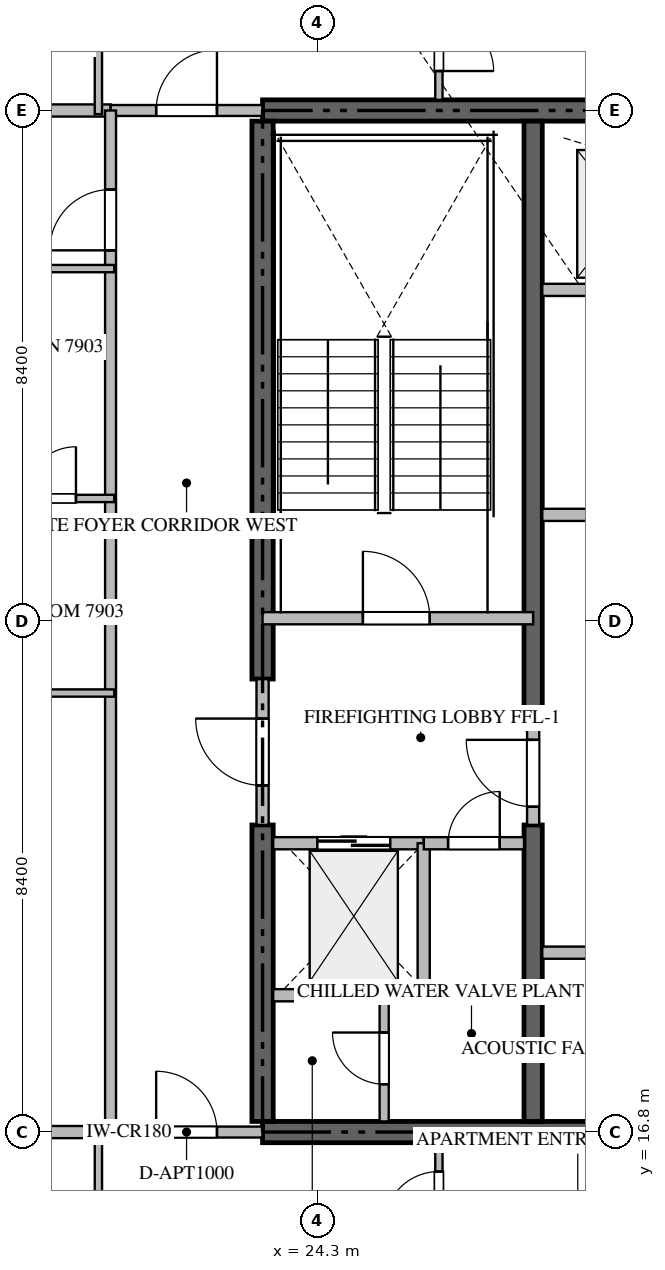
"""IFC4 building model, lengths in metres.
Left out: names, types, materials, properties, quantities, classifications, styles, units other than length and angle.
Written with IfcOpenShell. Run it as: python <this file> out.ifc"""

import sys

from ifc_helpers import new_model, si_unit, direction, frame, frame_2d, origin, place, context, subcontext, project, spatial, rectangle, extrude, source, transform, mapped, element, fill, save


model = new_model("IFC4")
c1 = context("Model", 3, precision=1e-05, world=origin(), true_north=direction((0.0, 1.0)))
c2 = subcontext(c1, "Body", "Model", "MODEL_VIEW")
j1 = project(units=[si_unit("LENGTHUNIT", "METRE"), si_unit("PLANEANGLEUNIT", "RADIAN")], contexts=[c1])
p1 = place(None, origin())
s1 = spatial("IfcSite", under=j1, at=p1, CompositionType="ELEMENT")
p2 = place(p1, origin())
s2 = spatial("IfcBuilding", under=s1, at=p2, CompositionType="ELEMENT")
p3 = place(p2, frame((0.0, 0.0, 317.75)))
s3 = spatial("IfcBuildingStorey", under=s2, at=p3, CompositionType="ELEMENT", Elevation=317.75)
for number, where, z_axis, x_axis in (
    (1, (23.4, 16.8, -0.26), (0.0, 0.0, 1.0), (1.0, 0.0, 0.0)),
    (2, (41.4, 33.6, -0.26), (0.0, 0.0, 1.0), (-1.0, 0.0, 0.0)),
):
    element("IfcWall", number, at=place(p3, frame(where, z_axis=z_axis, x_axis=x_axis)), inside=s3, PredefinedType="SHEAR", context=c2, shape_type="SweptSolid", body=[
        extrude(rectangle(XDim=18.0, YDim=0.35, at=frame_2d((9.0, 0.0))), origin(), (0.0, 0.0, 1.0), 4.048),
    ])
p4 = place(p3, frame((23.4, 16.975, -0.26), z_axis=(0.0, 0.0, 1.0), x_axis=(0.0, 1.0, 0.0)))
e3 = element("IfcWall", 3, at=p4, inside=s3, PredefinedType="SHEAR", context=c2, shape_type="SweptSolid", body=[
    extrude(rectangle(XDim=4.875, YDim=0.35, at=frame_2d((2.438, 0.0))), origin(), (0.0, 0.0, 1.0), 4.048),
])
p5 = place(p3, frame((23.4, 24.25, -0.26), z_axis=(0.0, 0.0, 1.0), x_axis=(0.0, 1.0, 0.0)))
e4 = element("IfcWall", 4, at=p5, inside=s3, PredefinedType="SHEAR", context=c2, shape_type="SweptSolid", body=[
    extrude(rectangle(XDim=9.175, YDim=0.35, at=frame_2d((4.587, 0.0))), origin(), (0.0, 0.0, 1.0), 4.048),
])
p6 = place(p3, frame((27.85, 16.975, -0.26), z_axis=(0.0, 0.0, 1.0), x_axis=(0.0, 1.0, 0.0)))
e5 = element("IfcWall", 5, at=p6, inside=s3, PredefinedType="SHEAR", context=c2, shape_type="SweptSolid", body=[
    extrude(rectangle(XDim=4.875, YDim=0.3, at=frame_2d((2.438, 0.0))), origin(), (0.0, 0.0, 1.0), 4.048),
])
p7 = place(p3, frame((27.85, 23.55, -0.26), z_axis=(0.0, 0.0, 1.0), x_axis=(0.0, 1.0, 0.0)))
e6 = element("IfcWall", 6, at=p7, inside=s3, PredefinedType="SHEAR", context=c2, shape_type="SweptSolid", body=[
    extrude(rectangle(XDim=9.875, YDim=0.3, at=frame_2d((4.938, 0.0))), origin(), (0.0, 0.0, 1.0), 4.048),
])
p8 = place(p3, frame((23.4, 25.25, 0.0), z_axis=(0.0, 0.0, 1.0), x_axis=(1.0, 0.0, 0.0)))
e7 = element("IfcWall", 7, at=p8, inside=s3, PredefinedType="STANDARD", context=c2, shape_type="SweptSolid", body=[
    extrude(rectangle(XDim=4.45, YDim=0.2, at=frame_2d((2.225, 0.0))), origin(), (0.0, 0.0, 1.0), 3.79),
])
p9 = place(p8, frame((1.65, 0.0, 0.0)))
e8 = element("IfcOpeningElement", 8, at=p9, cuts=e7, PredefinedType="OPENING", context=c2, shape_type="SweptSolid", body=[
    extrude(rectangle(XDim=1.1, YDim=2.15, at=frame_2d((0.55, 1.075))), frame((0.0, 0.11, 0.0), z_axis=(0.0, -1.0, 0.0), x_axis=(1.0, 0.0, 0.0)), (0.0, 0.0, 1.0), 0.22),
])
p10 = place(p3, frame((23.575, 21.55, 0.0), z_axis=(0.0, 0.0, 1.0), x_axis=(1.0, 0.0, 0.0)))
e9 = element("IfcWall", 9, at=p10, inside=s3, PredefinedType="STANDARD", context=c2, shape_type="SweptSolid", body=[
    extrude(rectangle(XDim=2.475, YDim=0.2, at=frame_2d((1.238, 0.0))), origin(), (0.0, 0.0, 1.0), 3.79),
])
p11 = place(p10, frame((0.725, 0.0, 0.0)))
e10 = element("IfcOpeningElement", 10, at=p11, cuts=e9, PredefinedType="OPENING", context=c2, shape_type="SweptSolid", body=[
    extrude(rectangle(XDim=1.2, YDim=2.2, at=frame_2d((0.6, 1.1))), frame((0.0, 0.11, 0.0), z_axis=(0.0, -1.0, 0.0), x_axis=(1.0, 0.0, 0.0)), (0.0, 0.0, 1.0), 0.22),
])
p12 = place(p3, frame((28.0, 30.65, 0.0), z_axis=(0.0, 0.0, 1.0), x_axis=(1.0, 0.0, 0.0)))
e11 = element("IfcWall", 11, at=p12, inside=s3, PredefinedType="STANDARD", context=c2, shape_type="SweptSolid", body=[
    extrude(rectangle(XDim=2.55, YDim=0.2, at=frame_2d((1.275, 0.0))), origin(), (0.0, 0.0, 1.0), 3.79),
])
p13 = place(p12, frame((0.85, 0.0, 0.0)))
e12 = element("IfcOpeningElement", 12, at=p13, cuts=e11, PredefinedType="OPENING", context=c2, shape_type="SweptSolid", body=[
    extrude(rectangle(XDim=1.1, YDim=2.2, at=frame_2d((0.55, 1.1))), frame((0.0, 0.11, 0.0), z_axis=(0.0, -1.0, 0.0), x_axis=(1.0, 0.0, 0.0)), (0.0, 0.0, 1.0), 0.22),
])
p14 = place(p3, frame((26.05, 19.05, 0.0), z_axis=(0.0, 0.0, 1.0), x_axis=(0.0, 1.0, 0.0)))
e13 = element("IfcWall", 13, at=p14, inside=s3, PredefinedType="STANDARD", context=c2, shape_type="SweptSolid", body=[
    extrude(rectangle(XDim=2.5, YDim=0.2, at=frame_2d((1.25, 0.0))), origin(), (0.0, 0.0, 1.0), 3.79),
])
p15 = place(p3, frame((23.575, 19.05, 0.0), z_axis=(0.0, 0.0, 1.0), x_axis=(1.0, 0.0, 0.0)))
e14 = element("IfcWall", 14, at=p15, inside=s3, PredefinedType="STANDARD", context=c2, shape_type="SweptSolid", body=[
    extrude(rectangle(XDim=2.475, YDim=0.2, at=frame_2d((1.238, 0.0))), origin(), (0.0, 0.0, 1.0), 3.79),
])
p16 = place(p3, frame((26.052, 21.55, 0.0), z_axis=(0.0, 0.0, 1.0), x_axis=(1.0, 0.0, 0.0)))
e15 = element("IfcWall", 15, at=p16, inside=s3, PredefinedType="STANDARD", context=c2, shape_type="SweptSolid", body=[
    extrude(rectangle(XDim=1.648, YDim=0.2, at=frame_2d((0.824, 0.0))), origin(), (0.0, 0.0, 1.0), 3.79),
])
p17 = place(p16, frame((0.399, 0.0, 0.0)))
e16 = element("IfcOpeningElement", 16, at=p17, cuts=e15, PredefinedType="OPENING", context=c2, shape_type="SweptSolid", body=[
    extrude(rectangle(XDim=0.85, YDim=2.1, at=frame_2d((0.425, 1.05))), frame((0.0, 0.11, 0.0), z_axis=(0.0, -1.0, 0.0), x_axis=(1.0, 0.0, 0.0)), (0.0, 0.0, 1.0), 0.22),
])
p18 = place(p3, frame((23.4, 21.852, 0.0), z_axis=(0.0, 0.0, 1.0), x_axis=(0.0, 1.0, 0.0)))
e17 = element("IfcWall", 17, at=p18, inside=s3, PredefinedType="STANDARD", context=c2, shape_type="SweptSolid", body=[
    extrude(rectangle(XDim=2.396, YDim=0.2, at=frame_2d((1.198, 0.0))), origin(), (0.0, 0.0, 1.0), 3.79),
])
p19 = place(p18, frame((0.648, 0.0, 0.0)))
e18 = element("IfcOpeningElement", 18, at=p19, cuts=e17, PredefinedType="OPENING", context=c2, shape_type="SweptSolid", body=[
    extrude(rectangle(XDim=1.1, YDim=2.15, at=frame_2d((0.55, 1.075))), frame((0.0, 0.11, 0.0), z_axis=(0.0, -1.0, 0.0), x_axis=(1.0, 0.0, 0.0)), (0.0, 0.0, 1.0), 0.22),
])
p20 = place(p3, frame((27.85, 21.852, 0.0), z_axis=(0.0, 0.0, 1.0), x_axis=(0.0, 1.0, 0.0)))
e19 = element("IfcWall", 19, at=p20, inside=s3, PredefinedType="STANDARD", context=c2, shape_type="SweptSolid", body=[
    extrude(rectangle(XDim=1.696, YDim=0.2, at=frame_2d((0.848, 0.0))), origin(), (0.0, 0.0, 1.0), 3.79),
])
p21 = place(p20, frame((0.298, 0.0, 0.0)))
e20 = element("IfcOpeningElement", 20, at=p21, cuts=e19, PredefinedType="OPENING", context=c2, shape_type="SweptSolid", body=[
    extrude(rectangle(XDim=1.1, YDim=2.15, at=frame_2d((0.55, 1.075))), frame((0.0, 0.11, 0.0), z_axis=(0.0, -1.0, 0.0), x_axis=(1.0, 0.0, 0.0)), (0.0, 0.0, 1.0), 0.22),
])
p22 = place(p3, frame((25.4, 16.975, 0.0), z_axis=(0.0, 0.0, 1.0), x_axis=(0.0, 1.0, 0.0)))
e21 = element("IfcWall", 21, at=p22, inside=s3, PredefinedType="PARTITIONING", context=c2, shape_type="SweptSolid", body=[
    extrude(rectangle(XDim=2.075, YDim=0.15, at=frame_2d((1.038, 0.0))), origin(), (0.0, 0.0, 1.0), 3.79),
])
p23 = place(p22, frame((0.612, 0.0, 0.0)))
e22 = element("IfcOpeningElement", 22, at=p23, cuts=e21, PredefinedType="OPENING", context=c2, shape_type="SweptSolid", body=[
    extrude(rectangle(XDim=0.85, YDim=2.1, at=frame_2d((0.425, 1.05))), frame((0.0, 0.085, 0.0), z_axis=(0.0, -1.0, 0.0), x_axis=(1.0, 0.0, 0.0)), (0.0, 0.0, 1.0), 0.17),
])
p24 = place(p3, frame((28.0, 19.75, 0.0), z_axis=(0.0, 0.0, 1.0), x_axis=(1.0, 0.0, 0.0)))
e23 = element("IfcWall", 23, at=p24, inside=s3, PredefinedType="STANDARD", context=c2, shape_type="SweptSolid", body=[
    extrude(rectangle(XDim=4.4, YDim=0.2, at=frame_2d((2.2, 0.0))), origin(), (0.0, 0.0, 1.0), 3.79),
])
p25 = place(p24, frame((1.75, 0.0, 0.0)))
e24 = element("IfcOpeningElement", 24, at=p25, cuts=e23, PredefinedType="OPENING", context=c2, shape_type="SweptSolid", body=[
    extrude(rectangle(XDim=0.9, YDim=2.1, at=frame_2d((0.45, 1.05))), frame((0.0, 0.11, 0.0), z_axis=(0.0, -1.0, 0.0), x_axis=(1.0, 0.0, 0.0)), (0.0, 0.0, 1.0), 0.22),
])
p26 = place(p3, frame((28.0, 26.95, 0.0), z_axis=(0.0, 0.0, 1.0), x_axis=(1.0, 0.0, 0.0)))
e25 = element("IfcWall", 25, at=p26, inside=s3, PredefinedType="STANDARD", context=c2, shape_type="SweptSolid", body=[
    extrude(rectangle(XDim=6.95, YDim=0.2, at=frame_2d((3.475, 0.0))), origin(), (0.0, 0.0, 1.0), 3.79),
])
for number, where, z_axis, x_axis in (
    (26, (9.282, 16.8, 0.0), (0.0, 0.0, 1.0), (1.0, 0.0, 0.0)),
    (27, (9.282, 33.6, 0.0), (0.0, 0.0, 1.0), (1.0, 0.0, 0.0)),
):
    element("IfcWall", number, at=place(p3, frame(where, z_axis=z_axis, x_axis=x_axis)), inside=s3, PredefinedType="PARTITIONING", context=c2, shape_type="SweptSolid", body=[
        extrude(rectangle(XDim=11.618, YDim=0.2, at=frame_2d((5.809, 0.0))), origin(), (0.0, 0.0, 1.0), 3.79),
    ])
p27 = place(p3, frame((20.902, 16.8, 0.0), z_axis=(0.0, 0.0, 1.0), x_axis=(1.0, 0.0, 0.0)))
e28 = element("IfcWall", 28, at=p27, inside=s3, PredefinedType="PARTITIONING", context=c2, shape_type="SweptSolid", body=[
    extrude(rectangle(XDim=2.496, YDim=0.18, at=frame_2d((1.248, 0.0))), origin(), (0.0, 0.0, 1.0), 3.79),
])
p28 = place(p27, frame((0.748, 0.0, 0.0)))
e29 = element("IfcOpeningElement", 29, at=p28, cuts=e28, PredefinedType="OPENING", context=c2, shape_type="SweptSolid", body=[
    extrude(rectangle(XDim=1.0, YDim=2.15, at=frame_2d((0.5, 1.075))), frame((0.0, 0.1, 0.0), z_axis=(0.0, -1.0, 0.0), x_axis=(1.0, 0.0, 0.0)), (0.0, 0.0, 1.0), 0.2),
])
p29 = place(p3, frame((20.902, 33.6, 0.0), z_axis=(0.0, 0.0, 1.0), x_axis=(1.0, 0.0, 0.0)))
e30 = element("IfcWall", 30, at=p29, inside=s3, PredefinedType="PARTITIONING", context=c2, shape_type="SweptSolid", body=[
    extrude(rectangle(XDim=2.496, YDim=0.18, at=frame_2d((1.248, 0.0))), origin(), (0.0, 0.0, 1.0), 3.79),
])
p30 = place(p29, frame((0.748, 0.0, 0.0)))
e31 = element("IfcOpeningElement", 31, at=p30, cuts=e30, PredefinedType="OPENING", context=c2, shape_type="SweptSolid", body=[
    extrude(rectangle(XDim=1.0, YDim=2.15, at=frame_2d((0.5, 1.075))), frame((0.0, 0.1, 0.0), z_axis=(0.0, -1.0, 0.0), x_axis=(1.0, 0.0, 0.0)), (0.0, 0.0, 1.0), 0.2),
])
p31 = place(p3, frame((20.9, 16.8, 0.0), z_axis=(0.0, 0.0, 1.0), x_axis=(0.0, 1.0, 0.0)))
e32 = element("IfcWall", 32, at=p31, inside=s3, PredefinedType="PARTITIONING", context=c2, shape_type="SweptSolid", body=[
    extrude(rectangle(XDim=16.8, YDim=0.18, at=frame_2d((8.4, 0.0))), origin(), (0.0, 0.0, 1.0), 3.79),
])
p32 = place(p31, frame((14.5, 0.0, 0.0)))
e33 = element("IfcOpeningElement", 33, at=p32, cuts=e32, PredefinedType="OPENING", context=c2, shape_type="SweptSolid", body=[
    extrude(rectangle(XDim=1.0, YDim=2.15, at=frame_2d((0.5, 1.075))), frame((0.0, 0.1, 0.0), z_axis=(0.0, -1.0, 0.0), x_axis=(1.0, 0.0, 0.0)), (0.0, 0.0, 1.0), 0.2),
])
p33 = place(p3, frame((20.7, 14.05, 0.0), z_axis=(0.0, 0.0, 1.0), x_axis=(0.0, 1.0, 0.0)))
e34 = element("IfcWall", 34, at=p33, inside=s3, PredefinedType="PARTITIONING", context=c2, shape_type="SweptSolid", body=[
    extrude(rectangle(XDim=2.81, YDim=0.12, at=frame_2d((1.405, 0.0))), origin(), (0.0, 0.0, 1.0), 3.79),
])
p34 = place(p3, frame((26.3, 14.65, 0.0), z_axis=(0.0, 0.0, 1.0), x_axis=(0.0, 1.0, 0.0)))
e35 = element("IfcWall", 35, at=p34, inside=s3, PredefinedType="PARTITIONING", context=c2, shape_type="SweptSolid", body=[
    extrude(rectangle(XDim=1.975, YDim=0.12, at=frame_2d((0.988, 0.0))), origin(), (0.0, 0.0, 1.0), 3.79),
])
p35 = place(p34, frame((0.601, 0.0, 0.0)))
e36 = element("IfcOpeningElement", 36, at=p35, cuts=e35, PredefinedType="OPENING", context=c2, shape_type="SweptSolid", body=[
    extrude(rectangle(XDim=0.9, YDim=2.1, at=frame_2d((0.45, 1.05))), frame((0.0, 0.07, 0.0), z_axis=(0.0, -1.0, 0.0), x_axis=(1.0, 0.0, 0.0)), (0.0, 0.0, 1.0), 0.14),
])
p36 = place(p3, frame((20.7, 36.35, 0.0), z_axis=(0.0, 0.0, 1.0), x_axis=(0.0, -1.0, 0.0)))
e37 = element("IfcWall", 37, at=p36, inside=s3, PredefinedType="PARTITIONING", context=c2, shape_type="SweptSolid", body=[
    extrude(rectangle(XDim=2.81, YDim=0.12, at=frame_2d((1.405, 0.0))), origin(), (0.0, 0.0, 1.0), 3.79),
])
p37 = place(p3, frame((26.3, 35.75, 0.0), z_axis=(0.0, 0.0, 1.0), x_axis=(0.0, -1.0, 0.0)))
e38 = element("IfcWall", 38, at=p37, inside=s3, PredefinedType="PARTITIONING", context=c2, shape_type="SweptSolid", body=[
    extrude(rectangle(XDim=1.975, YDim=0.12, at=frame_2d((0.988, 0.0))), origin(), (0.0, 0.0, 1.0), 3.79),
])
p38 = place(p37, frame((0.601, 0.0, 0.0)))
e39 = element("IfcOpeningElement", 39, at=p38, cuts=e38, PredefinedType="OPENING", context=c2, shape_type="SweptSolid", body=[
    extrude(rectangle(XDim=0.9, YDim=2.1, at=frame_2d((0.45, 1.05))), frame((0.0, 0.07, 0.0), z_axis=(0.0, -1.0, 0.0), x_axis=(1.0, 0.0, 0.0)), (0.0, 0.0, 1.0), 0.14),
])
p39 = place(p3, frame((18.15, 31.0, 0.0), z_axis=(0.0, 0.0, 1.0), x_axis=(1.0, 0.0, 0.0)))
e40 = element("IfcWall", 40, at=p39, inside=s3, PredefinedType="PARTITIONING", context=c2, shape_type="SweptSolid", body=[
    extrude(rectangle(XDim=2.81, YDim=0.12, at=frame_2d((1.405, 0.0))), origin(), (0.0, 0.0, 1.0), 3.79),
])
p40 = place(p3, frame((18.85, 24.02, 0.0), z_axis=(0.0, 0.0, 1.0), x_axis=(1.0, 0.0, 0.0)))
e41 = element("IfcWall", 41, at=p40, inside=s3, PredefinedType="PARTITIONING", context=c2, shape_type="SweptSolid", body=[
    extrude(rectangle(XDim=2.11, YDim=0.12, at=frame_2d((1.055, 0.0))), origin(), (0.0, 0.0, 1.0), 3.79),
])
p41 = place(p3, frame((18.852, 27.22, 0.0), z_axis=(0.0, 0.0, 1.0), x_axis=(1.0, 0.0, 0.0)))
e42 = element("IfcWall", 42, at=p41, inside=s3, PredefinedType="PARTITIONING", context=c2, shape_type="SweptSolid", body=[
    extrude(rectangle(XDim=2.108, YDim=0.12, at=frame_2d((1.054, 0.0))), origin(), (0.0, 0.0, 1.0), 3.79),
])
p42 = place(p41, frame((0.629, 0.0, 0.0)))
e43 = element("IfcOpeningElement", 43, at=p42, cuts=e42, PredefinedType="OPENING", context=c2, shape_type="SweptSolid", body=[
    extrude(rectangle(XDim=0.85, YDim=2.1, at=frame_2d((0.425, 1.05))), frame((0.0, 0.07, 0.0), z_axis=(0.0, -1.0, 0.0), x_axis=(1.0, 0.0, 0.0)), (0.0, 0.0, 1.0), 0.14),
])
m1 = source(origin(), c2, "Body", "SweptSolid", [
    extrude(rectangle(XDim=1.1, YDim=2.15, at=frame_2d((0.55, 1.075))), frame((0.0, 0.025, 0.0), z_axis=(0.0, -1.0, 0.0), x_axis=(1.0, 0.0, 0.0)), (0.0, 0.0, 1.0), 0.05),
])
p43 = place(p9, origin())
e44 = element("IfcDoor", 44, at=p43, inside=s3, OperationType="SINGLE_SWING_LEFT", PredefinedType="DOOR", context=c2, shape_type="MappedRepresentation", body=[
    mapped(m1, transform((0.0, 0.0, 0.0), scale=1.0)),
])
fill(e8, e44)
m2 = source(origin(), c2, "Body", "SweptSolid", [
    extrude(rectangle(XDim=1.2, YDim=2.2, at=frame_2d((0.6, 1.1))), frame((0.0, 0.025, 0.0), z_axis=(0.0, -1.0, 0.0), x_axis=(1.0, 0.0, 0.0)), (0.0, 0.0, 1.0), 0.05),
])
p44 = place(p11, origin())
e45 = element("IfcDoor", 45, at=p44, inside=s3, OperationType="DOUBLE_DOOR_SLIDING", PredefinedType="DOOR", context=c2, shape_type="MappedRepresentation", body=[
    mapped(m2, transform((0.0, 0.0, 0.0), scale=1.0)),
])
fill(e10, e45)
m3 = source(origin(), c2, "Body", "SweptSolid", [
    extrude(rectangle(XDim=0.85, YDim=2.1, at=frame_2d((0.425, 1.05))), frame((0.0, 0.025, 0.0), z_axis=(0.0, -1.0, 0.0), x_axis=(1.0, 0.0, 0.0)), (0.0, 0.0, 1.0), 0.05),
])
p45 = place(p17, origin())
e46 = element("IfcDoor", 46, at=p45, inside=s3, OperationType="SINGLE_SWING_RIGHT", PredefinedType="DOOR", context=c2, shape_type="MappedRepresentation", body=[
    mapped(m3, transform((0.0, 0.0, 0.0), scale=1.0)),
])
fill(e16, e46)
p46 = place(p19, origin())
e47 = element("IfcDoor", 47, at=p46, inside=s3, OperationType="SINGLE_SWING_RIGHT", PredefinedType="DOOR", context=c2, shape_type="MappedRepresentation", body=[
    mapped(m1, transform((0.0, 0.0, 0.0), scale=1.0)),
])
fill(e18, e47)
p47 = place(p21, origin())
e48 = element("IfcDoor", 48, at=p47, inside=s3, OperationType="SINGLE_SWING_RIGHT", PredefinedType="DOOR", context=c2, shape_type="MappedRepresentation", body=[
    mapped(m1, transform((0.0, 0.0, 0.0), scale=1.0)),
])
fill(e20, e48)
p48 = place(p23, origin())
e49 = element("IfcDoor", 49, at=p48, inside=s3, OperationType="SINGLE_SWING_RIGHT", PredefinedType="DOOR", context=c2, shape_type="MappedRepresentation", body=[
    mapped(m3, transform((0.0, 0.0, 0.0), scale=1.0)),
])
fill(e22, e49)
m4 = source(origin(), c2, "Body", "SweptSolid", [
    extrude(rectangle(XDim=1.0, YDim=2.15, at=frame_2d((0.5, 1.075))), frame((0.0, 0.025, 0.0), z_axis=(0.0, -1.0, 0.0), x_axis=(1.0, 0.0, 0.0)), (0.0, 0.0, 1.0), 0.05),
])
p49 = place(p28, origin())
e50 = element("IfcDoor", 50, at=p49, inside=s3, OperationType="SINGLE_SWING_LEFT", PredefinedType="DOOR", context=c2, shape_type="MappedRepresentation", body=[
    mapped(m4, transform((0.0, 0.0, 0.0), scale=1.0)),
])
fill(e29, e50)
p50 = place(p30, origin())
e51 = element("IfcDoor", 51, at=p50, inside=s3, OperationType="SINGLE_SWING_RIGHT", PredefinedType="DOOR", context=c2, shape_type="MappedRepresentation", body=[
    mapped(m4, transform((0.0, 0.0, 0.0), scale=1.0)),
])
fill(e31, e51)
p51 = place(p32, origin())
e52 = element("IfcDoor", 52, at=p51, inside=s3, OperationType="SINGLE_SWING_LEFT", PredefinedType="DOOR", context=c2, shape_type="MappedRepresentation", body=[
    mapped(m4, transform((0.0, 0.0, 0.0), scale=1.0)),
])
fill(e33, e52)
m5 = source(origin(), c2, "Body", "SweptSolid", [
    extrude(rectangle(XDim=0.9, YDim=2.1, at=frame_2d((0.45, 1.05))), frame((0.0, 0.025, 0.0), z_axis=(0.0, -1.0, 0.0), x_axis=(1.0, 0.0, 0.0)), (0.0, 0.0, 1.0), 0.05),
])
p52 = place(p35, origin())
e53 = element("IfcDoor", 53, at=p52, inside=s3, OperationType="SINGLE_SWING_LEFT", PredefinedType="DOOR", context=c2, shape_type="MappedRepresentation", body=[
    mapped(m5, transform((0.0, 0.0, 0.0), scale=1.0)),
])
fill(e36, e53)
p53 = place(p38, origin())
e54 = element("IfcDoor", 54, at=p53, inside=s3, OperationType="SINGLE_SWING_RIGHT", PredefinedType="DOOR", context=c2, shape_type="MappedRepresentation", body=[
    mapped(m5, transform((0.0, 0.0, 0.0), scale=1.0)),
])
fill(e39, e54)
p54 = place(p42, origin())
e55 = element("IfcDoor", 55, at=p54, inside=s3, OperationType="SINGLE_SWING_RIGHT", PredefinedType="DOOR", context=c2, shape_type="MappedRepresentation", body=[
    mapped(m3, transform((0.0, 0.0, 0.0), scale=1.0)),
])
fill(e43, e55)
save(model, sys.argv[1])
